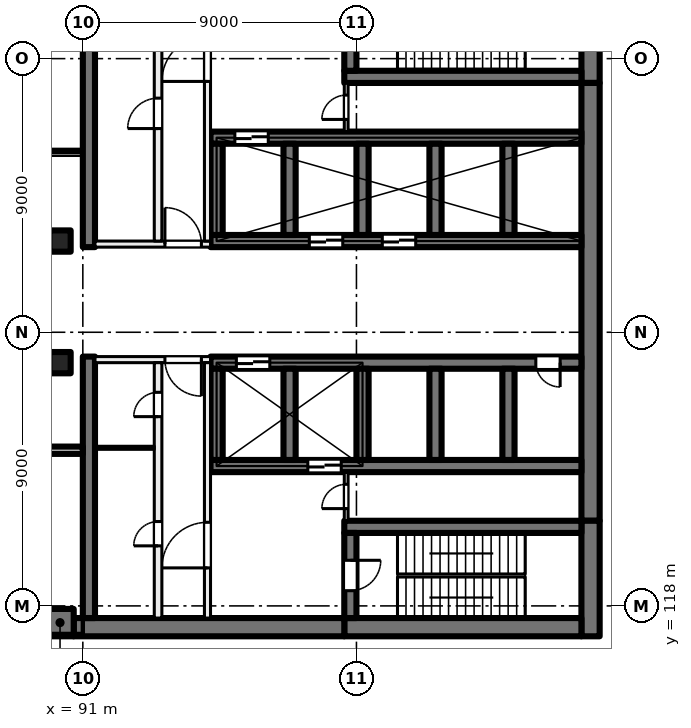
"""IFC4 building model, lengths in metres.
Left out: names, types, materials, properties, quantities, classifications, styles, units other than length and angle.
Written with IfcOpenShell. Run it as: python <this file> out.ifc"""

import sys

from ifc_helpers import new_model, si_unit, direction, frame, frame_2d, origin, origin_2d, place, context, subcontext, project, spatial, rectangle, extrude, element, fill, save


model = new_model("IFC4")
c1 = context("Model", 3, precision=1e-05, world=origin(), true_north=direction((0.0, 1.0)))
c2 = subcontext(c1, "Body", "Model", "MODEL_VIEW")
j1 = project(units=[si_unit("LENGTHUNIT", "METRE"), si_unit("PLANEANGLEUNIT", "RADIAN")], contexts=[c1])
p1 = place(None, origin())
s1 = spatial("IfcSite", under=j1, at=p1, CompositionType="ELEMENT")
p2 = place(p1, origin())
s2 = spatial("IfcBuilding", under=s1, at=p2, CompositionType="ELEMENT")
p3 = place(p2, frame((0.0, 0.0, 75.5)))
s3 = spatial("IfcBuildingStorey", under=s2, at=p3, CompositionType="ELEMENT", Elevation=75.5)
for number, where, z_axis, x_axis in (
    (1, (90.25, 130.0, 0.0), (0.0, 0.0, 1.0), (1.0, 0.0, 0.0)),
    (2, (90.25, 126.0, 0.0), (0.0, 0.0, 1.0), (1.0, 0.0, 0.0)),
):
    element("IfcColumn", number, at=place(p3, frame(where, z_axis=z_axis, x_axis=x_axis)), inside=s3, PredefinedType="COLUMN", context=c2, shape_type="SweptSolid", body=[
        extrude(rectangle(XDim=0.7, YDim=0.7, at=origin_2d()), origin(), (0.0, 0.0, 1.0), 5.5),
    ])
p4 = place(p3, frame((90.25, 117.45, 0.0), z_axis=(0.0, 0.0, 1.0), x_axis=(1.0, 0.0, 0.0)))
e3 = element("IfcColumn", 3, at=p4, inside=s3, PredefinedType="COLUMN", context=c2, shape_type="SweptSolid", body=[
    extrude(rectangle(XDim=0.9, YDim=0.9, at=origin_2d()), origin(), (0.0, 0.0, 1.0), 5.5),
])
p5 = place(p3, frame((107.7, 139.0, 0.0), z_axis=(0.0, 0.0, 1.0), x_axis=(0.0, -1.0, 0.0)))
e4 = element("IfcWall", 4, at=p5, inside=s3, PredefinedType="SHEAR", context=c2, shape_type="SweptSolid", body=[
    extrude(rectangle(XDim=3.8, YDim=0.6, at=frame_2d((1.9, 0.0))), origin(), (0.0, 0.0, 1.0), 5.5),
])
p6 = place(p3, frame((107.7, 135.2, 0.0), z_axis=(0.0, 0.0, 1.0), x_axis=(0.0, -1.0, 0.0)))
e5 = element("IfcWall", 5, at=p6, inside=s3, PredefinedType="SHEAR", context=c2, shape_type="SweptSolid", body=[
    extrude(rectangle(XDim=14.4, YDim=0.6, at=frame_2d((7.2, 0.0))), origin(), (0.0, 0.0, 1.0), 5.5),
])
p7 = place(p3, frame((107.7, 120.8, 0.0), z_axis=(0.0, 0.0, 1.0), x_axis=(0.0, -1.0, 0.0)))
e6 = element("IfcWall", 6, at=p7, inside=s3, PredefinedType="SHEAR", context=c2, shape_type="SweptSolid", body=[
    extrude(rectangle(XDim=3.8, YDim=0.6, at=frame_2d((1.9, 0.0))), origin(), (0.0, 0.0, 1.0), 5.5),
])
p8 = place(p3, frame((107.4, 117.3, 0.0), z_axis=(0.0, 0.0, 1.0), x_axis=(-1.0, 0.0, 0.0)))
e7 = element("IfcWall", 7, at=p8, inside=s3, PredefinedType="SHEAR", context=c2, shape_type="SweptSolid", body=[
    extrude(rectangle(XDim=7.8, YDim=0.6, at=frame_2d((3.9, 0.0))), origin(), (0.0, 0.0, 1.0), 5.5),
])
p9 = place(p3, frame((99.6, 117.3, 0.0), z_axis=(0.0, 0.0, 1.0), x_axis=(-1.0, 0.0, 0.0)))
e8 = element("IfcWall", 8, at=p9, inside=s3, PredefinedType="SHEAR", context=c2, shape_type="SweptSolid", body=[
    extrude(rectangle(XDim=8.9, YDim=0.6, at=frame_2d((4.45, 0.0))), origin(), (0.0, 0.0, 1.0), 5.5),
])
p10 = place(p3, frame((107.4, 135.4, 0.0), z_axis=(0.0, 0.0, 1.0), x_axis=(-1.0, 0.0, 0.0)))
e9 = element("IfcWall", 9, at=p10, inside=s3, PredefinedType="SHEAR", context=c2, shape_type="SweptSolid", body=[
    extrude(rectangle(XDim=7.8, YDim=0.4, at=frame_2d((3.9, 0.0))), origin(), (0.0, 0.0, 1.0), 5.5),
])
p11 = place(p3, frame((99.8, 138.4, 0.0), z_axis=(0.0, 0.0, 1.0), x_axis=(0.0, -1.0, 0.0)))
e10 = element("IfcWall", 10, at=p11, inside=s3, PredefinedType="SHEAR", context=c2, shape_type="SweptSolid", body=[
    extrude(rectangle(XDim=2.8, YDim=0.4, at=frame_2d((1.4, 0.0))), origin(), (0.0, 0.0, 1.0), 5.5),
])
p12 = place(p11, frame((0.9, 0.0, 0.0)))
e11 = element("IfcOpeningElement", 11, at=p12, cuts=e10, PredefinedType="OPENING", context=c2, shape_type="SweptSolid", body=[
    extrude(rectangle(XDim=1.0, YDim=2.1, at=frame_2d((0.5, 1.05))), frame((0.0, 0.21, 0.0), z_axis=(0.0, -1.0, 0.0), x_axis=(1.0, 0.0, 0.0)), (0.0, 0.0, 1.0), 0.42),
])
p13 = place(p3, frame((107.4, 120.6, 0.0), z_axis=(0.0, 0.0, 1.0), x_axis=(-1.0, 0.0, 0.0)))
e12 = element("IfcWall", 12, at=p13, inside=s3, PredefinedType="SHEAR", context=c2, shape_type="SweptSolid", body=[
    extrude(rectangle(XDim=7.8, YDim=0.4, at=frame_2d((3.9, 0.0))), origin(), (0.0, 0.0, 1.0), 5.5),
])
p14 = place(p3, frame((99.8, 120.4, 0.0), z_axis=(0.0, 0.0, 1.0), x_axis=(0.0, -1.0, 0.0)))
e13 = element("IfcWall", 13, at=p14, inside=s3, PredefinedType="SHEAR", context=c2, shape_type="SweptSolid", body=[
    extrude(rectangle(XDim=2.8, YDim=0.4, at=frame_2d((1.4, 0.0))), origin(), (0.0, 0.0, 1.0), 5.5),
])
p15 = place(p14, frame((0.9, 0.0, 0.0)))
e14 = element("IfcOpeningElement", 14, at=p15, cuts=e13, PredefinedType="OPENING", context=c2, shape_type="SweptSolid", body=[
    extrude(rectangle(XDim=1.0, YDim=2.1, at=frame_2d((0.5, 1.05))), frame((0.0, 0.21, 0.0), z_axis=(0.0, -1.0, 0.0), x_axis=(1.0, 0.0, 0.0)), (0.0, 0.0, 1.0), 0.42),
])
p16 = place(p3, frame((107.4, 130.0, 0.0), z_axis=(0.0, 0.0, 1.0), x_axis=(-1.0, 0.0, 0.0)))
e15 = element("IfcWall", 15, at=p16, inside=s3, PredefinedType="SHEAR", context=c2, shape_type="SweptSolid", body=[
    extrude(rectangle(XDim=12.2, YDim=0.4, at=frame_2d((6.1, 0.0))), origin(), (0.0, 0.0, 1.0), 5.5),
])
p17 = place(p16, frame((5.45, 0.0, 0.0)))
e16 = element("IfcOpeningElement", 16, at=p17, cuts=e15, PredefinedType="OPENING", context=c2, shape_type="SweptSolid", body=[
    extrude(rectangle(XDim=1.1, YDim=2.1, at=frame_2d((0.55, 1.05))), frame((0.0, 0.21, 0.0), z_axis=(0.0, -1.0, 0.0), x_axis=(1.0, 0.0, 0.0)), (0.0, 0.0, 1.0), 0.42),
])
p18 = place(p16, frame((7.85, 0.0, 0.0)))
e17 = element("IfcOpeningElement", 17, at=p18, cuts=e15, PredefinedType="OPENING", context=c2, shape_type="SweptSolid", body=[
    extrude(rectangle(XDim=1.1, YDim=2.1, at=frame_2d((0.55, 1.05))), frame((0.0, 0.21, 0.0), z_axis=(0.0, -1.0, 0.0), x_axis=(1.0, 0.0, 0.0)), (0.0, 0.0, 1.0), 0.42),
])
p19 = place(p3, frame((107.4, 133.4, 0.0), z_axis=(0.0, 0.0, 1.0), x_axis=(-1.0, 0.0, 0.0)))
e18 = element("IfcWall", 18, at=p19, inside=s3, PredefinedType="SHEAR", context=c2, shape_type="SweptSolid", body=[
    extrude(rectangle(XDim=12.2, YDim=0.4, at=frame_2d((6.1, 0.0))), origin(), (0.0, 0.0, 1.0), 5.5),
])
p20 = place(p19, frame((10.3, 0.0, 0.0)))
e19 = element("IfcOpeningElement", 19, at=p20, cuts=e18, PredefinedType="OPENING", context=c2, shape_type="SweptSolid", body=[
    extrude(rectangle(XDim=1.1, YDim=2.1, at=frame_2d((0.55, 1.05))), frame((0.0, 0.21, 0.0), z_axis=(0.0, -1.0, 0.0), x_axis=(1.0, 0.0, 0.0)), (0.0, 0.0, 1.0), 0.42),
])
for number, where, z_axis, x_axis in (
    (20, (105.0, 133.2, 0.0), (0.0, 0.0, 1.0), (0.0, -1.0, 0.0)),
    (21, (102.6, 133.2, 0.0), (0.0, 0.0, 1.0), (0.0, -1.0, 0.0)),
    (22, (100.2, 133.2, 0.0), (0.0, 0.0, 1.0), (0.0, -1.0, 0.0)),
    (23, (97.8, 133.2, 0.0), (0.0, 0.0, 1.0), (0.0, -1.0, 0.0)),
    (24, (95.4, 133.2, 0.0), (0.0, 0.0, 1.0), (0.0, -1.0, 0.0)),
):
    element("IfcWall", number, at=place(p3, frame(where, z_axis=z_axis, x_axis=x_axis)), inside=s3, PredefinedType="SHEAR", context=c2, shape_type="SweptSolid", body=[
        extrude(rectangle(XDim=3.0, YDim=0.4, at=frame_2d((1.5, 0.0))), origin(), (0.0, 0.0, 1.0), 5.5),
    ])
p21 = place(p3, frame((107.4, 126.0, 0.0), z_axis=(0.0, 0.0, 1.0), x_axis=(-1.0, 0.0, 0.0)))
e25 = element("IfcWall", 25, at=p21, inside=s3, PredefinedType="SHEAR", context=c2, shape_type="SweptSolid", body=[
    extrude(rectangle(XDim=12.2, YDim=0.4, at=frame_2d((6.1, 0.0))), origin(), (0.0, 0.0, 1.0), 5.5),
])
p22 = place(p21, frame((10.25, 0.0, 0.0)))
e26 = element("IfcOpeningElement", 26, at=p22, cuts=e25, PredefinedType="OPENING", context=c2, shape_type="SweptSolid", body=[
    extrude(rectangle(XDim=1.1, YDim=2.1, at=frame_2d((0.55, 1.05))), frame((0.0, 0.21, 0.0), z_axis=(0.0, -1.0, 0.0), x_axis=(1.0, 0.0, 0.0)), (0.0, 0.0, 1.0), 0.42),
])
p23 = place(p21, frame((0.7, 0.0, 0.0)))
e27 = element("IfcOpeningElement", 27, at=p23, cuts=e25, PredefinedType="OPENING", context=c2, shape_type="SweptSolid", body=[
    extrude(rectangle(XDim=0.8, YDim=2.1, at=frame_2d((0.4, 1.05))), frame((0.0, 0.21, 0.0), z_axis=(0.0, -1.0, 0.0), x_axis=(1.0, 0.0, 0.0)), (0.0, 0.0, 1.0), 0.42),
])
p24 = place(p3, frame((107.4, 122.6, 0.0), z_axis=(0.0, 0.0, 1.0), x_axis=(-1.0, 0.0, 0.0)))
e28 = element("IfcWall", 28, at=p24, inside=s3, PredefinedType="SHEAR", context=c2, shape_type="SweptSolid", body=[
    extrude(rectangle(XDim=12.2, YDim=0.4, at=frame_2d((6.1, 0.0))), origin(), (0.0, 0.0, 1.0), 5.5),
])
p25 = place(p24, frame((7.9, 0.0, 0.0)))
e29 = element("IfcOpeningElement", 29, at=p25, cuts=e28, PredefinedType="OPENING", context=c2, shape_type="SweptSolid", body=[
    extrude(rectangle(XDim=1.1, YDim=2.1, at=frame_2d((0.55, 1.05))), frame((0.0, 0.21, 0.0), z_axis=(0.0, -1.0, 0.0), x_axis=(1.0, 0.0, 0.0)), (0.0, 0.0, 1.0), 0.42),
])
for number, where, z_axis, x_axis in (
    (30, (105.0, 125.8, 0.0), (0.0, 0.0, 1.0), (0.0, -1.0, 0.0)),
    (31, (102.6, 125.8, 0.0), (0.0, 0.0, 1.0), (0.0, -1.0, 0.0)),
    (32, (100.2, 125.8, 0.0), (0.0, 0.0, 1.0), (0.0, -1.0, 0.0)),
    (33, (97.8, 125.8, 0.0), (0.0, 0.0, 1.0), (0.0, -1.0, 0.0)),
    (34, (95.4, 125.8, 0.0), (0.0, 0.0, 1.0), (0.0, -1.0, 0.0)),
):
    element("IfcWall", number, at=place(p3, frame(where, z_axis=z_axis, x_axis=x_axis)), inside=s3, PredefinedType="SHEAR", context=c2, shape_type="SweptSolid", body=[
        extrude(rectangle(XDim=3.0, YDim=0.4, at=frame_2d((1.5, 0.0))), origin(), (0.0, 0.0, 1.0), 5.5),
    ])
for number, where, z_axis, x_axis in (
    (35, (91.2, 138.4, 0.0), (0.0, 0.0, 1.0), (0.0, -1.0, 0.0)),
    (36, (91.2, 126.2, 0.0), (0.0, 0.0, 1.0), (0.0, -1.0, 0.0)),
):
    element("IfcWall", number, at=place(p3, frame(where, z_axis=z_axis, x_axis=x_axis)), inside=s3, PredefinedType="SHEAR", context=c2, shape_type="SweptSolid", body=[
        extrude(rectangle(XDim=8.6, YDim=0.4, at=frame_2d((4.3, 0.0))), origin(), (0.0, 0.0, 1.0), 5.5),
    ])
p26 = place(p3, frame((91.0, 123.12, 0.0), z_axis=(0.0, 0.0, 1.0), x_axis=(-1.0, 0.0, 0.0)))
e37 = element("IfcWall", 37, at=p26, inside=s3, PredefinedType="SOLIDWALL", context=c2, shape_type="SweptSolid", body=[
    extrude(rectangle(XDim=4.221, YDim=0.24, at=frame_2d((2.11, 0.0))), origin(), (0.0, 0.0, 1.0), 5.125),
])
p27 = place(p26, frame((1.21, 0.0, 0.0)))
e38 = element("IfcOpeningElement", 38, at=p27, cuts=e37, PredefinedType="OPENING", context=c2, shape_type="SweptSolid", body=[
    extrude(rectangle(XDim=1.8, YDim=2.4, at=frame_2d((0.9, 1.2))), frame((0.0, 0.13, 0.0), z_axis=(0.0, -1.0, 0.0), x_axis=(1.0, 0.0, 0.0)), (0.0, 0.0, 1.0), 0.26),
])
p28 = place(p3, frame((95.2, 126.1, 0.0), z_axis=(0.0, 0.0, 1.0), x_axis=(-1.0, 0.0, 0.0)))
e39 = element("IfcWall", 39, at=p28, inside=s3, PredefinedType="PARTITIONING", context=c2, shape_type="SweptSolid", body=[
    extrude(rectangle(XDim=3.8, YDim=0.2, at=frame_2d((1.9, 0.0))), origin(), (0.0, 0.0, 1.0), 5.125),
])
p29 = place(p28, frame((0.3, 0.0, 0.0)))
e40 = element("IfcOpeningElement", 40, at=p29, cuts=e39, PredefinedType="OPENING", context=c2, shape_type="SweptSolid", body=[
    extrude(rectangle(XDim=1.2, YDim=2.1, at=frame_2d((0.6, 1.05))), frame((0.0, 0.11, 0.0), z_axis=(0.0, -1.0, 0.0), x_axis=(1.0, 0.0, 0.0)), (0.0, 0.0, 1.0), 0.22),
])
p30 = place(p3, frame((95.1, 117.6, 0.0), z_axis=(0.0, 0.0, 1.0), x_axis=(0.0, 1.0, 0.0)))
e41 = element("IfcWall", 41, at=p30, inside=s3, PredefinedType="PARTITIONING", context=c2, shape_type="SweptSolid", body=[
    extrude(rectangle(XDim=8.4, YDim=0.2, at=frame_2d((4.2, 0.0))), origin(), (0.0, 0.0, 1.0), 5.125),
])
p31 = place(p30, frame((1.65, 0.0, 0.0)))
e42 = element("IfcOpeningElement", 42, at=p31, cuts=e41, PredefinedType="OPENING", context=c2, shape_type="SweptSolid", body=[
    extrude(rectangle(XDim=1.5, YDim=2.1, at=frame_2d((0.75, 1.05))), frame((0.0, 0.11, 0.0), z_axis=(0.0, -1.0, 0.0), x_axis=(1.0, 0.0, 0.0)), (0.0, 0.0, 1.0), 0.22),
])
p32 = place(p3, frame((93.475, 117.6, 0.0), z_axis=(0.0, 0.0, 1.0), x_axis=(0.0, 1.0, 0.0)))
e43 = element("IfcWall", 43, at=p32, inside=s3, PredefinedType="PARTITIONING", context=c2, shape_type="SweptSolid", body=[
    extrude(rectangle(XDim=8.4, YDim=0.25, at=frame_2d((4.2, 0.0))), origin(), (0.0, 0.0, 1.0), 5.125),
])
p33 = place(p32, frame((6.625, 0.0, 0.0)))
e44 = element("IfcOpeningElement", 44, at=p33, cuts=e43, PredefinedType="OPENING", context=c2, shape_type="SweptSolid", body=[
    extrude(rectangle(XDim=0.8, YDim=2.1, at=frame_2d((0.4, 1.05))), frame((0.0, 0.135, 0.0), z_axis=(0.0, -1.0, 0.0), x_axis=(1.0, 0.0, 0.0)), (0.0, 0.0, 1.0), 0.27),
])
p34 = place(p32, frame((2.375, 0.0, 0.0)))
e45 = element("IfcOpeningElement", 45, at=p34, cuts=e43, PredefinedType="OPENING", context=c2, shape_type="SweptSolid", body=[
    extrude(rectangle(XDim=0.8, YDim=2.1, at=frame_2d((0.4, 1.05))), frame((0.0, 0.135, 0.0), z_axis=(0.0, -1.0, 0.0), x_axis=(1.0, 0.0, 0.0)), (0.0, 0.0, 1.0), 0.27),
])
p35 = place(p3, frame((99.663, 120.8, 0.0), z_axis=(0.0, 0.0, 1.0), x_axis=(0.0, 1.0, 0.0)))
e46 = element("IfcWall", 46, at=p35, inside=s3, PredefinedType="PARTITIONING", context=c2, shape_type="SweptSolid", body=[
    extrude(rectangle(XDim=1.6, YDim=0.125, at=frame_2d((0.8, 0.0))), origin(), (0.0, 0.0, 1.0), 5.125),
])
p36 = place(p35, frame((0.4, 0.0, 0.0)))
e47 = element("IfcOpeningElement", 47, at=p36, cuts=e46, PredefinedType="OPENING", context=c2, shape_type="SweptSolid", body=[
    extrude(rectangle(XDim=0.8, YDim=2.1, at=frame_2d((0.4, 1.05))), frame((0.0, 0.073, 0.0), z_axis=(0.0, -1.0, 0.0), x_axis=(1.0, 0.0, 0.0)), (0.0, 0.0, 1.0), 0.145),
])
p37 = place(p3, frame((93.35, 123.2, 0.0), z_axis=(0.0, 0.0, 1.0), x_axis=(-1.0, 0.0, 0.0)))
e48 = element("IfcWall", 48, at=p37, inside=s3, PredefinedType="PARTITIONING", context=c2, shape_type="SweptSolid", body=[
    extrude(rectangle(XDim=1.95, YDim=0.1, at=frame_2d((0.975, 0.0))), origin(), (0.0, 0.0, 1.0), 5.125),
])
p38 = place(p3, frame((91.4, 129.9, 0.0), z_axis=(0.0, 0.0, 1.0), x_axis=(1.0, 0.0, 0.0)))
e49 = element("IfcWall", 49, at=p38, inside=s3, PredefinedType="PARTITIONING", context=c2, shape_type="SweptSolid", body=[
    extrude(rectangle(XDim=3.8, YDim=0.2, at=frame_2d((1.9, 0.0))), origin(), (0.0, 0.0, 1.0), 5.125),
])
p39 = place(p38, frame((2.3, 0.0, 0.0)))
e50 = element("IfcOpeningElement", 50, at=p39, cuts=e49, PredefinedType="OPENING", context=c2, shape_type="SweptSolid", body=[
    extrude(rectangle(XDim=1.2, YDim=2.1, at=frame_2d((0.6, 1.05))), frame((0.0, 0.11, 0.0), z_axis=(0.0, -1.0, 0.0), x_axis=(1.0, 0.0, 0.0)), (0.0, 0.0, 1.0), 0.22),
])
p40 = place(p3, frame((95.1, 130.0, 0.0), z_axis=(0.0, 0.0, 1.0), x_axis=(0.0, 1.0, 0.0)))
e51 = element("IfcWall", 51, at=p40, inside=s3, PredefinedType="PARTITIONING", context=c2, shape_type="SweptSolid", body=[
    extrude(rectangle(XDim=8.4, YDim=0.2, at=frame_2d((4.2, 0.0))), origin(), (0.0, 0.0, 1.0), 5.125),
])
p41 = place(p40, frame((5.25, 0.0, 0.0)))
e52 = element("IfcOpeningElement", 52, at=p41, cuts=e51, PredefinedType="OPENING", context=c2, shape_type="SweptSolid", body=[
    extrude(rectangle(XDim=1.5, YDim=2.1, at=frame_2d((0.75, 1.05))), frame((0.0, 0.11, 0.0), z_axis=(0.0, -1.0, 0.0), x_axis=(1.0, 0.0, 0.0)), (0.0, 0.0, 1.0), 0.22),
])
p42 = place(p3, frame((93.475, 130.0, 0.0), z_axis=(0.0, 0.0, 1.0), x_axis=(0.0, 1.0, 0.0)))
e53 = element("IfcWall", 53, at=p42, inside=s3, PredefinedType="PARTITIONING", context=c2, shape_type="SweptSolid", body=[
    extrude(rectangle(XDim=8.4, YDim=0.25, at=frame_2d((4.2, 0.0))), origin(), (0.0, 0.0, 1.0), 5.125),
])
p43 = place(p42, frame((3.7, 0.0, 0.0)))
e54 = element("IfcOpeningElement", 54, at=p43, cuts=e53, PredefinedType="OPENING", context=c2, shape_type="SweptSolid", body=[
    extrude(rectangle(XDim=1.0, YDim=2.1, at=frame_2d((0.5, 1.05))), frame((0.0, 0.135, 0.0), z_axis=(0.0, -1.0, 0.0), x_axis=(1.0, 0.0, 0.0)), (0.0, 0.0, 1.0), 0.27),
])
p44 = place(p3, frame((99.663, 133.6, 0.0), z_axis=(0.0, 0.0, 1.0), x_axis=(0.0, 1.0, 0.0)))
e55 = element("IfcWall", 55, at=p44, inside=s3, PredefinedType="PARTITIONING", context=c2, shape_type="SweptSolid", body=[
    extrude(rectangle(XDim=1.6, YDim=0.125, at=frame_2d((0.8, 0.0))), origin(), (0.0, 0.0, 1.0), 5.125),
])
p45 = place(p44, frame((0.4, 0.0, 0.0)))
e56 = element("IfcOpeningElement", 56, at=p45, cuts=e55, PredefinedType="OPENING", context=c2, shape_type="SweptSolid", body=[
    extrude(rectangle(XDim=0.8, YDim=2.1, at=frame_2d((0.4, 1.05))), frame((0.0, 0.073, 0.0), z_axis=(0.0, -1.0, 0.0), x_axis=(1.0, 0.0, 0.0)), (0.0, 0.0, 1.0), 0.145),
])
p46 = place(p22, origin())
e57 = element("IfcDoor", 57, at=p46, inside=s3, OperationType="DOUBLE_DOOR_SLIDING", PredefinedType="DOOR", context=c2, shape_type="SweptSolid", body=[
    extrude(rectangle(XDim=1.1, YDim=2.1, at=frame_2d((0.55, 1.05))), frame((0.0, 0.025, 0.0), z_axis=(0.0, -1.0, 0.0), x_axis=(1.0, 0.0, 0.0)), (0.0, 0.0, 1.0), 0.05),
])
fill(e26, e57)
p47 = place(p17, origin())
e58 = element("IfcDoor", 58, at=p47, inside=s3, OperationType="DOUBLE_DOOR_SLIDING", PredefinedType="DOOR", context=c2, shape_type="SweptSolid", body=[
    extrude(rectangle(XDim=1.1, YDim=2.1, at=frame_2d((0.55, 1.05))), frame((0.0, 0.025, 0.0), z_axis=(0.0, -1.0, 0.0), x_axis=(1.0, 0.0, 0.0)), (0.0, 0.0, 1.0), 0.05),
])
fill(e16, e58)
p48 = place(p18, origin())
e59 = element("IfcDoor", 59, at=p48, inside=s3, OperationType="DOUBLE_DOOR_SLIDING", PredefinedType="DOOR", context=c2, shape_type="SweptSolid", body=[
    extrude(rectangle(XDim=1.1, YDim=2.1, at=frame_2d((0.55, 1.05))), frame((0.0, 0.025, 0.0), z_axis=(0.0, -1.0, 0.0), x_axis=(1.0, 0.0, 0.0)), (0.0, 0.0, 1.0), 0.05),
])
fill(e17, e59)
p49 = place(p23, origin())
e60 = element("IfcDoor", 60, at=p49, inside=s3, OperationType="SINGLE_SWING_LEFT", PredefinedType="DOOR", context=c2, shape_type="SweptSolid", body=[
    extrude(rectangle(XDim=0.8, YDim=2.1, at=frame_2d((0.4, 1.05))), frame((0.0, 0.025, 0.0), z_axis=(0.0, -1.0, 0.0), x_axis=(1.0, 0.0, 0.0)), (0.0, 0.0, 1.0), 0.05),
])
fill(e27, e60)
p50 = place(p29, origin())
e61 = element("IfcDoor", 61, at=p50, inside=s3, OperationType="DOUBLE_DOOR_SINGLE_SWING", PredefinedType="DOOR", context=c2, shape_type="SweptSolid", body=[
    extrude(rectangle(XDim=1.2, YDim=2.1, at=frame_2d((0.6, 1.05))), frame((0.0, 0.025, 0.0), z_axis=(0.0, -1.0, 0.0), x_axis=(1.0, 0.0, 0.0)), (0.0, 0.0, 1.0), 0.05),
])
fill(e40, e61)
p51 = place(p31, origin())
e62 = element("IfcDoor", 62, at=p51, inside=s3, OperationType="DOUBLE_DOOR_SINGLE_SWING", PredefinedType="DOOR", context=c2, shape_type="SweptSolid", body=[
    extrude(rectangle(XDim=1.5, YDim=2.1, at=frame_2d((0.75, 1.05))), frame((0.0, 0.025, 0.0), z_axis=(0.0, -1.0, 0.0), x_axis=(1.0, 0.0, 0.0)), (0.0, 0.0, 1.0), 0.05),
])
fill(e42, e62)
p52 = place(p15, origin())
e63 = element("IfcDoor", 63, at=p52, inside=s3, OperationType="SINGLE_SWING_LEFT", PredefinedType="DOOR", context=c2, shape_type="SweptSolid", body=[
    extrude(rectangle(XDim=1.0, YDim=2.1, at=frame_2d((0.5, 1.05))), frame((0.0, 0.025, 0.0), z_axis=(0.0, -1.0, 0.0), x_axis=(1.0, 0.0, 0.0)), (0.0, 0.0, 1.0), 0.05),
])
fill(e14, e63)
p53 = place(p36, origin())
e64 = element("IfcDoor", 64, at=p53, inside=s3, OperationType="SINGLE_SWING_RIGHT", PredefinedType="DOOR", context=c2, shape_type="SweptSolid", body=[
    extrude(rectangle(XDim=0.8, YDim=2.1, at=frame_2d((0.4, 1.05))), frame((0.0, 0.025, 0.0), z_axis=(0.0, -1.0, 0.0), x_axis=(1.0, 0.0, 0.0)), (0.0, 0.0, 1.0), 0.05),
])
fill(e47, e64)
p54 = place(p33, origin())
e65 = element("IfcDoor", 65, at=p54, inside=s3, OperationType="SINGLE_SWING_LEFT", PredefinedType="DOOR", context=c2, shape_type="SweptSolid", body=[
    extrude(rectangle(XDim=0.8, YDim=2.1, at=frame_2d((0.4, 1.05))), frame((0.0, 0.025, 0.0), z_axis=(0.0, -1.0, 0.0), x_axis=(1.0, 0.0, 0.0)), (0.0, 0.0, 1.0), 0.05),
])
fill(e44, e65)
p55 = place(p34, origin())
e66 = element("IfcDoor", 66, at=p55, inside=s3, OperationType="SINGLE_SWING_RIGHT", PredefinedType="DOOR", context=c2, shape_type="SweptSolid", body=[
    extrude(rectangle(XDim=0.8, YDim=2.1, at=frame_2d((0.4, 1.05))), frame((0.0, 0.025, 0.0), z_axis=(0.0, -1.0, 0.0), x_axis=(1.0, 0.0, 0.0)), (0.0, 0.0, 1.0), 0.05),
])
fill(e45, e66)
p56 = place(p39, origin())
e67 = element("IfcDoor", 67, at=p56, inside=s3, OperationType="DOUBLE_DOOR_SINGLE_SWING", PredefinedType="DOOR", context=c2, shape_type="SweptSolid", body=[
    extrude(rectangle(XDim=1.2, YDim=2.1, at=frame_2d((0.6, 1.05))), frame((0.0, 0.025, 0.0), z_axis=(0.0, -1.0, 0.0), x_axis=(1.0, 0.0, 0.0)), (0.0, 0.0, 1.0), 0.05),
])
fill(e50, e67)
p57 = place(p41, origin())
e68 = element("IfcDoor", 68, at=p57, inside=s3, OperationType="DOUBLE_DOOR_SINGLE_SWING", PredefinedType="DOOR", context=c2, shape_type="SweptSolid", body=[
    extrude(rectangle(XDim=1.5, YDim=2.1, at=frame_2d((0.75, 1.05))), frame((0.0, 0.025, 0.0), z_axis=(0.0, -1.0, 0.0), x_axis=(1.0, 0.0, 0.0)), (0.0, 0.0, 1.0), 0.05),
])
fill(e52, e68)
p58 = place(p45, origin())
e69 = element("IfcDoor", 69, at=p58, inside=s3, OperationType="SINGLE_SWING_LEFT", PredefinedType="DOOR", context=c2, shape_type="SweptSolid", body=[
    extrude(rectangle(XDim=0.8, YDim=2.1, at=frame_2d((0.4, 1.05))), frame((0.0, 0.025, 0.0), z_axis=(0.0, -1.0, 0.0), x_axis=(1.0, 0.0, 0.0)), (0.0, 0.0, 1.0), 0.05),
])
fill(e56, e69)
p59 = place(p43, origin())
e70 = element("IfcDoor", 70, at=p59, inside=s3, OperationType="SINGLE_SWING_RIGHT", PredefinedType="DOOR", context=c2, shape_type="SweptSolid", body=[
    extrude(rectangle(XDim=1.0, YDim=2.1, at=frame_2d((0.5, 1.05))), frame((0.0, 0.025, 0.0), z_axis=(0.0, -1.0, 0.0), x_axis=(1.0, 0.0, 0.0)), (0.0, 0.0, 1.0), 0.05),
])
fill(e54, e70)
p60 = place(p20, origin())
e71 = element("IfcDoor", 71, at=p60, inside=s3, OperationType="DOUBLE_DOOR_SLIDING", PredefinedType="DOOR", context=c2, shape_type="SweptSolid", body=[
    extrude(rectangle(XDim=1.1, YDim=2.1, at=frame_2d((0.55, 1.05))), frame((0.0, 0.025, 0.0), z_axis=(0.0, -1.0, 0.0), x_axis=(1.0, 0.0, 0.0)), (0.0, 0.0, 1.0), 0.05),
])
fill(e19, e71)
p61 = place(p25, origin())
e72 = element("IfcDoor", 72, at=p61, inside=s3, OperationType="DOUBLE_DOOR_SLIDING", PredefinedType="DOOR", context=c2, shape_type="SweptSolid", body=[
    extrude(rectangle(XDim=1.1, YDim=2.1, at=frame_2d((0.55, 1.05))), frame((0.0, 0.025, 0.0), z_axis=(0.0, -1.0, 0.0), x_axis=(1.0, 0.0, 0.0)), (0.0, 0.0, 1.0), 0.05),
])
fill(e29, e72)
save(model, sys.argv[1])
